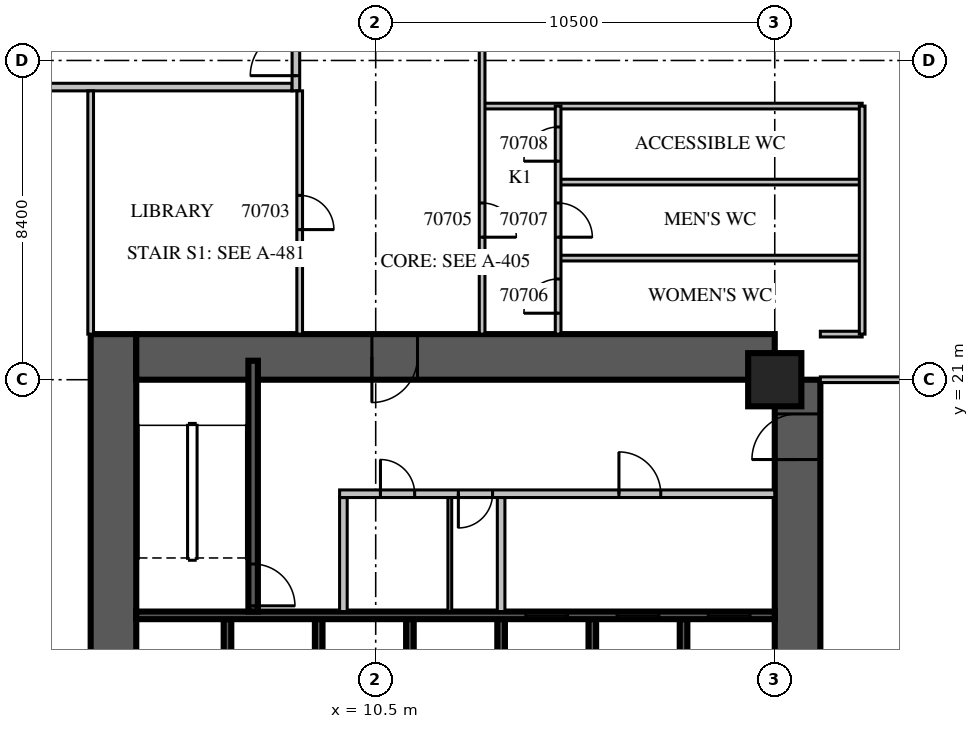
"""IFC4 building model, lengths in metres.
Left out: names, types, materials, properties, quantities, classifications, styles, units other than length and angle.
Written with IfcOpenShell. Run it as: python <this file> out.ifc"""

import sys

from ifc_helpers import new_model, si_unit, direction, frame, frame_2d, origin, origin_2d, place, context, subcontext, project, spatial, rectangle, extrude, source, transform, mapped, element, fill, save


model = new_model("IFC4")
c1 = context("Model", 3, precision=1e-05, world=origin(), true_north=direction((0.0, 1.0)))
c2 = subcontext(c1, "Body", "Model", "MODEL_VIEW")
j1 = project(units=[si_unit("LENGTHUNIT", "METRE"), si_unit("PLANEANGLEUNIT", "RADIAN")], contexts=[c1])
p1 = place(None, origin())
s1 = spatial("IfcSite", under=j1, at=p1, CompositionType="ELEMENT")
p2 = place(p1, origin())
s2 = spatial("IfcBuilding", under=s1, at=p2, CompositionType="ELEMENT")
p3 = place(p2, frame((0.0, 0.0, 23.7)))
s3 = spatial("IfcBuildingStorey", under=s2, at=p3, CompositionType="ELEMENT", Elevation=23.7)
m1 = source(origin(), c2, "Body", "SweptSolid", [
    extrude(rectangle(XDim=1.4, YDim=1.4, at=origin_2d()), origin(), (0.0, 0.0, 1.0), 5.4),
])
p4 = place(p3, frame((21.0, 21.0, 0.0), z_axis=(0.0, 0.0, 1.0), x_axis=(1.0, 0.0, 0.0)))
e1 = element("IfcColumn", 1, at=p4, inside=s3, PredefinedType="COLUMN", context=c2, shape_type="MappedRepresentation", body=[
    mapped(m1, transform((0.0, 0.0, 0.0), scale=1.0)),
])
m2 = source(origin(), c2, "Body", "SweptSolid", [
    extrude(rectangle(XDim=18.0, YDim=1.2, at=frame_2d((9.0, 0.0))), origin(), (0.0, 0.0, 1.0), 5.4),
])
p5 = place(p3, frame((3.6, 4.2, 0.0), z_axis=(0.0, 0.0, 1.0), x_axis=(0.0, 1.0, 0.0)))
e2 = element("IfcWall", 2, at=p5, inside=s3, PredefinedType="SHEAR", context=c2, shape_type="MappedRepresentation", body=[
    mapped(m2, transform((0.0, 0.0, 0.0), scale=1.0)),
])
m3 = source(origin(), c2, "Body", "SweptSolid", [
    extrude(rectangle(XDim=2.2, YDim=2.1, at=frame_2d((1.1, 1.05))), frame((0.0, 0.61, 0.0), z_axis=(0.0, -1.0, 0.0), x_axis=(1.0, 0.0, 0.0)), (0.0, 0.0, 1.0), 1.22),
])
p6 = place(p5, frame((4.6, 0.0, 0.0)))
e3 = element("IfcOpeningElement", 3, at=p6, cuts=e2, PredefinedType="OPENING", context=c2, shape_type="MappedRepresentation", body=[
    mapped(m3, transform((0.0, 0.0, 0.0), scale=1.0)),
])
m4 = source(origin(), c2, "Body", "SweptSolid", [
    extrude(rectangle(XDim=16.8, YDim=1.2, at=frame_2d((8.4, 0.0))), origin(), (0.0, 0.0, 1.0), 5.4),
])
p7 = place(p3, frame((21.6, 4.2, 0.0), z_axis=(0.0, 0.0, 1.0), x_axis=(0.0, 1.0, 0.0)))
e4 = element("IfcWall", 4, at=p7, inside=s3, PredefinedType="SHEAR", context=c2, shape_type="MappedRepresentation", body=[
    mapped(m4, transform((0.0, 0.0, 0.0), scale=1.0)),
])
p8 = place(p7, frame((4.2, 0.0, 0.0)))
e5 = element("IfcOpeningElement", 5, at=p8, cuts=e4, PredefinedType="OPENING", context=c2, shape_type="MappedRepresentation", body=[
    mapped(m3, transform((0.0, 0.0, 0.0), scale=1.0)),
])
m5 = source(origin(), c2, "Body", "SweptSolid", [
    extrude(rectangle(XDim=1.2, YDim=2.1, at=frame_2d((0.6, 1.05))), frame((0.0, 0.61, 0.0), z_axis=(0.0, -1.0, 0.0), x_axis=(1.0, 0.0, 0.0)), (0.0, 0.0, 1.0), 1.22),
])
p9 = place(p7, frame((14.7, 0.0, 0.0)))
e6 = element("IfcOpeningElement", 6, at=p9, cuts=e4, PredefinedType="OPENING", context=c2, shape_type="MappedRepresentation", body=[
    mapped(m5, transform((0.0, 0.0, 0.0), scale=1.0)),
])
p10 = place(p3, frame((4.2, 21.6, 0.0), z_axis=(0.0, 0.0, 1.0), x_axis=(1.0, 0.0, 0.0)))
e7 = element("IfcWall", 7, at=p10, inside=s3, PredefinedType="SHEAR", context=c2, shape_type="MappedRepresentation", body=[
    mapped(m4, transform((0.0, 0.0, 0.0), scale=1.0)),
])
p11 = place(p10, frame((6.2, 0.0, 0.0)))
e8 = element("IfcOpeningElement", 8, at=p11, cuts=e7, PredefinedType="OPENING", context=c2, shape_type="MappedRepresentation", body=[
    mapped(m5, transform((0.0, 0.0, 0.0), scale=1.0)),
])
m6 = source(origin(), c2, "Body", "SweptSolid", [
    extrude(rectangle(XDim=3.0, YDim=0.2, at=frame_2d((1.5, 0.0))), origin(), (0.0, 0.0, 1.0), 5.4),
])
for number, where, z_axis, x_axis in (
    (9, (6.6, 11.7, 0.0), (0.0, 0.0, 1.0), (0.0, 1.0, 0.0)),
    (10, (9.0, 11.7, 0.0), (0.0, 0.0, 1.0), (0.0, 1.0, 0.0)),
    (11, (11.4, 11.7, 0.0), (0.0, 0.0, 1.0), (0.0, 1.0, 0.0)),
    (12, (13.8, 11.7, 0.0), (0.0, 0.0, 1.0), (0.0, 1.0, 0.0)),
    (13, (16.2, 11.7, 0.0), (0.0, 0.0, 1.0), (0.0, 1.0, 0.0)),
    (14, (18.6, 11.7, 0.0), (0.0, 0.0, 1.0), (0.0, 1.0, 0.0)),
):
    element("IfcWall", number, at=place(p3, frame(where, z_axis=z_axis, x_axis=x_axis)), inside=s3, PredefinedType="SOLIDWALL", context=c2, shape_type="MappedRepresentation", body=[
        mapped(m6, transform((0.0, 0.0, 0.0), scale=1.0)),
    ])
m7 = source(origin(), c2, "Body", "SweptSolid", [
    extrude(rectangle(XDim=16.8, YDim=0.2, at=frame_2d((8.4, 0.0))), origin(), (0.0, 0.0, 1.0), 5.4),
])
p12 = place(p3, frame((4.2, 14.8, 0.0), z_axis=(0.0, 0.0, 1.0), x_axis=(1.0, 0.0, 0.0)))
e15 = element("IfcWall", 15, at=p12, inside=s3, PredefinedType="SOLIDWALL", context=c2, shape_type="MappedRepresentation", body=[
    mapped(m7, transform((0.0, 0.0, 0.0), scale=1.0)),
])
m8 = source(origin(), c2, "Body", "SweptSolid", [
    extrude(rectangle(XDim=1.1, YDim=2.1, at=frame_2d((0.55, 1.05))), frame((0.0, 0.11, 0.0), z_axis=(0.0, -1.0, 0.0), x_axis=(1.0, 0.0, 0.0)), (0.0, 0.0, 1.0), 0.22),
])
p13 = place(p12, frame((10.25, 0.0, 0.0)))
e16 = element("IfcOpeningElement", 16, at=p13, cuts=e15, PredefinedType="OPENING", context=c2, shape_type="MappedRepresentation", body=[
    mapped(m8, transform((0.0, 0.0, 0.0), scale=1.0)),
])
p14 = place(p12, frame((12.65, 0.0, 0.0)))
e17 = element("IfcOpeningElement", 17, at=p14, cuts=e15, PredefinedType="OPENING", context=c2, shape_type="MappedRepresentation", body=[
    mapped(m8, transform((0.0, 0.0, 0.0), scale=1.0)),
])
p15 = place(p12, frame((15.05, 0.0, 0.0)))
e18 = element("IfcOpeningElement", 18, at=p15, cuts=e15, PredefinedType="OPENING", context=c2, shape_type="MappedRepresentation", body=[
    mapped(m8, transform((0.0, 0.0, 0.0), scale=1.0)),
])
m9 = source(origin(), c2, "Body", "SweptSolid", [
    extrude(rectangle(XDim=6.6, YDim=0.25, at=frame_2d((3.3, 0.0))), origin(), (0.0, 0.0, 1.0), 4.8),
])
p16 = place(p3, frame((7.275, 14.9, 0.0), z_axis=(0.0, 0.0, 1.0), x_axis=(0.0, 1.0, 0.0)))
e19 = element("IfcWall", 19, at=p16, inside=s3, PredefinedType="SOLIDWALL", context=c2, shape_type="MappedRepresentation", body=[
    mapped(m9, transform((0.0, 0.0, 0.0), scale=1.0)),
])
m10 = source(origin(), c2, "Body", "SweptSolid", [
    extrude(rectangle(XDim=1.1, YDim=2.1, at=frame_2d((0.55, 1.05))), frame((0.0, 0.135, 0.0), z_axis=(0.0, -1.0, 0.0), x_axis=(1.0, 0.0, 0.0)), (0.0, 0.0, 1.0), 0.27),
])
p17 = place(p16, frame((0.15, 0.0, 0.0)))
e20 = element("IfcOpeningElement", 20, at=p17, cuts=e19, PredefinedType="OPENING", context=c2, shape_type="MappedRepresentation", body=[
    mapped(m10, transform((0.0, 0.0, 0.0), scale=1.0)),
])
m11 = source(origin(), c2, "Body", "SweptSolid", [
    extrude(rectangle(XDim=3.0, YDim=0.2, at=frame_2d((1.5, 0.0))), origin(), (0.0, 0.0, 1.0), 4.8),
])
p18 = place(p3, frame((9.65, 14.9, 0.0), z_axis=(0.0, 0.0, 1.0), x_axis=(0.0, 1.0, 0.0)))
e21 = element("IfcWall", 21, at=p18, inside=s3, PredefinedType="PARTITIONING", context=c2, shape_type="MappedRepresentation", body=[
    mapped(m11, transform((0.0, 0.0, 0.0), scale=1.0)),
])
m12 = source(origin(), c2, "Body", "SweptSolid", [
    extrude(rectangle(XDim=11.45, YDim=0.2, at=frame_2d((5.725, 0.0))), origin(), (0.0, 0.0, 1.0), 4.8),
])
p19 = place(p3, frame((9.55, 18.0, 0.0), z_axis=(0.0, 0.0, 1.0), x_axis=(1.0, 0.0, 0.0)))
e22 = element("IfcWall", 22, at=p19, inside=s3, PredefinedType="PARTITIONING", context=c2, shape_type="MappedRepresentation", body=[
    mapped(m12, transform((0.0, 0.0, 0.0), scale=1.0)),
])
m13 = source(origin(), c2, "Body", "SweptSolid", [
    extrude(rectangle(XDim=0.9, YDim=2.1, at=frame_2d((0.45, 1.05))), frame((0.0, 0.11, 0.0), z_axis=(0.0, -1.0, 0.0), x_axis=(1.0, 0.0, 0.0)), (0.0, 0.0, 1.0), 0.22),
])
p20 = place(p19, frame((1.075, 0.0, 0.0)))
e23 = element("IfcOpeningElement", 23, at=p20, cuts=e22, PredefinedType="OPENING", context=c2, shape_type="MappedRepresentation", body=[
    mapped(m13, transform((0.0, 0.0, 0.0), scale=1.0)),
])
p21 = place(p19, frame((3.125, 0.0, 0.0)))
e24 = element("IfcOpeningElement", 24, at=p21, cuts=e22, PredefinedType="OPENING", context=c2, shape_type="MappedRepresentation", body=[
    mapped(m13, transform((0.0, 0.0, 0.0), scale=1.0)),
])
p22 = place(p19, frame((7.35, 0.0, 0.0)))
e25 = element("IfcOpeningElement", 25, at=p22, cuts=e22, PredefinedType="OPENING", context=c2, shape_type="MappedRepresentation", body=[
    mapped(m8, transform((0.0, 0.0, 0.0), scale=1.0)),
])
p23 = place(p3, frame((13.8, 14.9, 0.0), z_axis=(0.0, 0.0, 1.0), x_axis=(0.0, 1.0, 0.0)))
e26 = element("IfcWall", 26, at=p23, inside=s3, PredefinedType="PARTITIONING", context=c2, shape_type="MappedRepresentation", body=[
    mapped(m11, transform((0.0, 0.0, 0.0), scale=1.0)),
])
m14 = source(origin(), c2, "Body", "SweptSolid", [
    extrude(rectangle(XDim=3.0, YDim=0.1, at=frame_2d((1.5, 0.0))), origin(), (0.0, 0.0, 1.0), 4.8),
])
p24 = place(p3, frame((12.45, 14.9, 0.0), z_axis=(0.0, 0.0, 1.0), x_axis=(0.0, 1.0, 0.0)))
e27 = element("IfcWall", 27, at=p24, inside=s3, PredefinedType="PARTITIONING", context=c2, shape_type="MappedRepresentation", body=[
    mapped(m14, transform((0.0, 0.0, 0.0), scale=1.0)),
])
m15 = source(origin(), c2, "Body", "SweptSolid", [
    extrude(rectangle(XDim=8.0, YDim=0.2, at=frame_2d((4.0, 0.0))), origin(), (0.0, 0.0, 1.0), 4.8),
])
p25 = place(p3, frame((0.3, 28.7, 0.0), z_axis=(0.0, 0.0, 1.0), x_axis=(1.0, 0.0, 0.0)))
e28 = element("IfcWall", 28, at=p25, inside=s3, PredefinedType="PARTITIONING", context=c2, shape_type="MappedRepresentation", body=[
    mapped(m15, transform((0.0, 0.0, 0.0), scale=1.0)),
])
m16 = source(origin(), c2, "Body", "SweptSolid", [
    extrude(rectangle(XDim=5.45, YDim=0.2, at=frame_2d((2.725, 0.0))), origin(), (0.0, 0.0, 1.0), 4.8),
])
p26 = place(p3, frame((8.4, 28.6, 0.0), z_axis=(0.0, 0.0, 1.0), x_axis=(0.0, 1.0, 0.0)))
e29 = element("IfcWall", 29, at=p26, inside=s3, PredefinedType="PARTITIONING", context=c2, shape_type="MappedRepresentation", body=[
    mapped(m16, transform((0.0, 0.0, 0.0), scale=1.0)),
])
m17 = source(origin(), c2, "Body", "SweptSolid", [
    extrude(rectangle(XDim=1.2, YDim=2.1, at=frame_2d((0.6, 1.05))), frame((0.0, 0.11, 0.0), z_axis=(0.0, -1.0, 0.0), x_axis=(1.0, 0.0, 0.0)), (0.0, 0.0, 1.0), 0.22),
])
p27 = place(p26, frame((0.4, 0.0, 0.0)))
e30 = element("IfcOpeningElement", 30, at=p27, cuts=e29, PredefinedType="OPENING", context=c2, shape_type="MappedRepresentation", body=[
    mapped(m17, transform((0.0, 0.0, 0.0), scale=1.0)),
])
p28 = place(p26, frame((3.25, 0.0, 0.0)))
e31 = element("IfcOpeningElement", 31, at=p28, cuts=e29, PredefinedType="OPENING", context=c2, shape_type="MappedRepresentation", body=[
    mapped(m13, transform((0.0, 0.0, 0.0), scale=1.0)),
])
m18 = source(origin(), c2, "Body", "SweptSolid", [
    extrude(rectangle(XDim=16.2, YDim=0.15, at=frame_2d((8.1, 0.0))), origin(), (0.0, 0.0, 1.0), 4.8),
])
p29 = place(p3, frame((22.2, 21.0, 0.0), z_axis=(0.0, 0.0, 1.0), x_axis=(1.0, 0.0, 0.0)))
e32 = element("IfcWall", 32, at=p29, inside=s3, PredefinedType="PARTITIONING", context=c2, shape_type="MappedRepresentation", body=[
    mapped(m18, transform((0.0, 0.0, 0.0), scale=1.0)),
])
m19 = source(origin(), c2, "Body", "SweptSolid", [
    extrude(rectangle(XDim=1.1, YDim=0.15, at=frame_2d((0.55, 0.0))), origin(), (0.0, 0.0, 1.0), 4.8),
])
p30 = place(p3, frame((22.2, 22.2, 0.0), z_axis=(0.0, 0.0, 1.0), x_axis=(1.0, 0.0, 0.0)))
e33 = element("IfcWall", 33, at=p30, inside=s3, PredefinedType="PARTITIONING", context=c2, shape_type="MappedRepresentation", body=[
    mapped(m19, transform((0.0, 0.0, 0.0), scale=1.0)),
])
m20 = source(origin(), c2, "Body", "SweptSolid", [
    extrude(rectangle(XDim=8.0, YDim=0.15, at=frame_2d((4.0, 0.0))), origin(), (0.0, 0.0, 1.0), 4.8),
])
for number, where, z_axis, x_axis in (
    (34, (15.3, 24.2, 0.0), (0.0, 0.0, 1.0), (1.0, 0.0, 0.0)),
    (35, (15.3, 26.2, 0.0), (0.0, 0.0, 1.0), (1.0, 0.0, 0.0)),
):
    element("IfcWall", number, at=place(p3, frame(where, z_axis=z_axis, x_axis=x_axis)), inside=s3, PredefinedType="PARTITIONING", context=c2, shape_type="MappedRepresentation", body=[
        mapped(m20, transform((0.0, 0.0, 0.0), scale=1.0)),
    ])
m21 = source(origin(), c2, "Body", "SweptSolid", [
    extrude(rectangle(XDim=10.0, YDim=0.15, at=frame_2d((5.0, 0.0))), origin(), (0.0, 0.0, 1.0), 4.8),
])
p31 = place(p3, frame((13.3, 28.2, 0.0), z_axis=(0.0, 0.0, 1.0), x_axis=(1.0, 0.0, 0.0)))
e36 = element("IfcWall", 36, at=p31, inside=s3, PredefinedType="PARTITIONING", context=c2, shape_type="MappedRepresentation", body=[
    mapped(m21, transform((0.0, 0.0, 0.0), scale=1.0)),
])
m22 = source(origin(), c2, "Body", "SweptSolid", [
    extrude(rectangle(XDim=6.4, YDim=0.15, at=frame_2d((3.2, 0.0))), origin(), (0.0, 0.0, 1.0), 4.8),
])
p32 = place(p3, frame((3.0, 22.2, 0.0), z_axis=(0.0, 0.0, 1.0), x_axis=(0.0, 1.0, 0.0)))
e37 = element("IfcWall", 37, at=p32, inside=s3, PredefinedType="PARTITIONING", context=c2, shape_type="MappedRepresentation", body=[
    mapped(m22, transform((0.0, 0.0, 0.0), scale=1.0)),
])
p33 = place(p3, frame((8.5, 22.2, 0.0), z_axis=(0.0, 0.0, 1.0), x_axis=(0.0, 1.0, 0.0)))
e38 = element("IfcWall", 38, at=p33, inside=s3, PredefinedType="PARTITIONING", context=c2, shape_type="MappedRepresentation", body=[
    mapped(m22, transform((0.0, 0.0, 0.0), scale=1.0)),
])
m23 = source(origin(), c2, "Body", "SweptSolid", [
    extrude(rectangle(XDim=0.9, YDim=2.1, at=frame_2d((0.45, 1.05))), frame((0.0, 0.085, 0.0), z_axis=(0.0, -1.0, 0.0), x_axis=(1.0, 0.0, 0.0)), (0.0, 0.0, 1.0), 0.17),
])
p34 = place(p33, frame((2.75, 0.0, 0.0)))
e39 = element("IfcOpeningElement", 39, at=p34, cuts=e38, PredefinedType="OPENING", context=c2, shape_type="MappedRepresentation", body=[
    mapped(m23, transform((0.0, 0.0, 0.0), scale=1.0)),
])
m24 = source(origin(), c2, "Body", "SweptSolid", [
    extrude(rectangle(XDim=20.3, YDim=0.15, at=frame_2d((10.15, 0.0))), origin(), (0.0, 0.0, 1.0), 4.8),
])
p35 = place(p3, frame((13.3, 22.2, 0.0), z_axis=(0.0, 0.0, 1.0), x_axis=(0.0, 1.0, 0.0)))
e40 = element("IfcWall", 40, at=p35, inside=s3, PredefinedType="PARTITIONING", context=c2, shape_type="MappedRepresentation", body=[
    mapped(m24, transform((0.0, 0.0, 0.0), scale=1.0)),
])
p36 = place(p35, frame((2.55, 0.0, 0.0)))
e41 = element("IfcOpeningElement", 41, at=p36, cuts=e40, PredefinedType="OPENING", context=c2, shape_type="MappedRepresentation", body=[
    mapped(m23, transform((0.0, 0.0, 0.0), scale=1.0)),
])
m25 = source(origin(), c2, "Body", "SweptSolid", [
    extrude(rectangle(XDim=6.0, YDim=0.15, at=frame_2d((3.0, 0.0))), origin(), (0.0, 0.0, 1.0), 4.8),
])
p37 = place(p3, frame((15.3, 22.2, 0.0), z_axis=(0.0, 0.0, 1.0), x_axis=(0.0, 1.0, 0.0)))
e42 = element("IfcWall", 42, at=p37, inside=s3, PredefinedType="PARTITIONING", context=c2, shape_type="MappedRepresentation", body=[
    mapped(m25, transform((0.0, 0.0, 0.0), scale=1.0)),
])
p38 = place(p37, frame((0.55, 0.0, 0.0)))
e43 = element("IfcOpeningElement", 43, at=p38, cuts=e42, PredefinedType="OPENING", context=c2, shape_type="MappedRepresentation", body=[
    mapped(m23, transform((0.0, 0.0, 0.0), scale=1.0)),
])
p39 = place(p37, frame((2.55, 0.0, 0.0)))
e44 = element("IfcOpeningElement", 44, at=p39, cuts=e42, PredefinedType="OPENING", context=c2, shape_type="MappedRepresentation", body=[
    mapped(m23, transform((0.0, 0.0, 0.0), scale=1.0)),
])
p40 = place(p37, frame((4.55, 0.0, 0.0)))
e45 = element("IfcOpeningElement", 45, at=p40, cuts=e42, PredefinedType="OPENING", context=c2, shape_type="MappedRepresentation", body=[
    mapped(m23, transform((0.0, 0.0, 0.0), scale=1.0)),
])
p41 = place(p3, frame((23.3, 22.2, 0.0), z_axis=(0.0, 0.0, 1.0), x_axis=(0.0, 1.0, 0.0)))
e46 = element("IfcWall", 46, at=p41, inside=s3, PredefinedType="PARTITIONING", context=c2, shape_type="MappedRepresentation", body=[
    mapped(m25, transform((0.0, 0.0, 0.0), scale=1.0)),
])
m26 = source(origin(), c2, "Body", "SweptSolid", [
    extrude(rectangle(XDim=1.1, YDim=2.1, at=frame_2d((0.55, 1.05))), frame((0.0, 0.025, 0.0), z_axis=(0.0, -1.0, 0.0), x_axis=(1.0, 0.0, 0.0)), (0.0, 0.0, 1.0), 0.05),
])
p42 = place(p13, origin())
e47 = element("IfcDoor", 47, at=p42, inside=s3, OperationType="SLIDING_TO_LEFT", PredefinedType="DOOR", context=c2, shape_type="MappedRepresentation", body=[
    mapped(m26, transform((0.0, 0.0, 0.0), scale=1.0)),
])
fill(e16, e47)
p43 = place(p14, origin())
e48 = element("IfcDoor", 48, at=p43, inside=s3, OperationType="SLIDING_TO_LEFT", PredefinedType="DOOR", context=c2, shape_type="MappedRepresentation", body=[
    mapped(m26, transform((0.0, 0.0, 0.0), scale=1.0)),
])
fill(e17, e48)
p44 = place(p15, origin())
e49 = element("IfcDoor", 49, at=p44, inside=s3, OperationType="SLIDING_TO_LEFT", PredefinedType="DOOR", context=c2, shape_type="MappedRepresentation", body=[
    mapped(m26, transform((0.0, 0.0, 0.0), scale=1.0)),
])
fill(e18, e49)
p45 = place(p17, origin())
e50 = element("IfcDoor", 50, at=p45, inside=s3, OperationType="SINGLE_SWING_RIGHT", PredefinedType="DOOR", context=c2, shape_type="MappedRepresentation", body=[
    mapped(m26, transform((0.0, 0.0, 0.0), scale=1.0)),
])
fill(e20, e50)
m27 = source(origin(), c2, "Body", "SweptSolid", [
    extrude(rectangle(XDim=0.9, YDim=2.1, at=frame_2d((0.45, 1.05))), frame((0.0, 0.025, 0.0), z_axis=(0.0, -1.0, 0.0), x_axis=(1.0, 0.0, 0.0)), (0.0, 0.0, 1.0), 0.05),
])
p46 = place(p20, origin())
e51 = element("IfcDoor", 51, at=p46, inside=s3, OperationType="SINGLE_SWING_LEFT", PredefinedType="DOOR", context=c2, shape_type="MappedRepresentation", body=[
    mapped(m27, transform((0.0, 0.0, 0.0), scale=1.0)),
])
fill(e23, e51)
p47 = place(p21, origin())
e52 = element("IfcDoor", 52, at=p47, inside=s3, OperationType="SINGLE_SWING_RIGHT", PredefinedType="DOOR", context=c2, shape_type="MappedRepresentation", body=[
    mapped(m27, transform((0.0, 0.0, 0.0), scale=1.0)),
])
fill(e24, e52)
p48 = place(p22, origin())
e53 = element("IfcDoor", 53, at=p48, inside=s3, OperationType="SINGLE_SWING_LEFT", PredefinedType="DOOR", context=c2, shape_type="MappedRepresentation", body=[
    mapped(m26, transform((0.0, 0.0, 0.0), scale=1.0)),
])
fill(e25, e53)
m28 = source(origin(), c2, "Body", "SweptSolid", [
    extrude(rectangle(XDim=1.2, YDim=2.1, at=frame_2d((0.6, 1.05))), frame((0.0, 0.025, 0.0), z_axis=(0.0, -1.0, 0.0), x_axis=(1.0, 0.0, 0.0)), (0.0, 0.0, 1.0), 0.05),
])
p49 = place(p27, origin())
e54 = element("IfcDoor", 54, at=p49, inside=s3, OperationType="SINGLE_SWING_LEFT", PredefinedType="DOOR", context=c2, shape_type="MappedRepresentation", body=[
    mapped(m28, transform((0.0, 0.0, 0.0), scale=1.0)),
])
fill(e30, e54)
p50 = place(p11, origin())
e55 = element("IfcDoor", 55, at=p50, inside=s3, OperationType="SINGLE_SWING_RIGHT", PredefinedType="DOOR", context=c2, shape_type="MappedRepresentation", body=[
    mapped(m28, transform((0.0, 0.0, 0.0), scale=1.0)),
])
fill(e8, e55)
p51 = place(p9, origin())
e56 = element("IfcDoor", 56, at=p51, inside=s3, OperationType="SINGLE_SWING_LEFT", PredefinedType="DOOR", context=c2, shape_type="MappedRepresentation", body=[
    mapped(m28, transform((0.0, 0.0, 0.0), scale=1.0)),
])
fill(e6, e56)
p52 = place(p34, origin())
e57 = element("IfcDoor", 57, at=p52, inside=s3, OperationType="SINGLE_SWING_RIGHT", PredefinedType="DOOR", context=c2, shape_type="MappedRepresentation", body=[
    mapped(m27, transform((0.0, 0.0, 0.0), scale=1.0)),
])
fill(e39, e57)
p53 = place(p36, origin())
e58 = element("IfcDoor", 58, at=p53, inside=s3, OperationType="SINGLE_SWING_RIGHT", PredefinedType="DOOR", context=c2, shape_type="MappedRepresentation", body=[
    mapped(m27, transform((0.0, 0.0, 0.0), scale=1.0)),
])
fill(e41, e58)
p54 = place(p38, origin())
e59 = element("IfcDoor", 59, at=p54, inside=s3, OperationType="SINGLE_SWING_LEFT", PredefinedType="DOOR", context=c2, shape_type="MappedRepresentation", body=[
    mapped(m27, transform((0.0, 0.0, 0.0), scale=1.0)),
])
fill(e43, e59)
p55 = place(p39, origin())
e60 = element("IfcDoor", 60, at=p55, inside=s3, OperationType="SINGLE_SWING_RIGHT", PredefinedType="DOOR", context=c2, shape_type="MappedRepresentation", body=[
    mapped(m27, transform((0.0, 0.0, 0.0), scale=1.0)),
])
fill(e44, e60)
p56 = place(p40, origin())
e61 = element("IfcDoor", 61, at=p56, inside=s3, OperationType="SINGLE_SWING_LEFT", PredefinedType="DOOR", context=c2, shape_type="MappedRepresentation", body=[
    mapped(m27, transform((0.0, 0.0, 0.0), scale=1.0)),
])
fill(e45, e61)
save(model, sys.argv[1])
